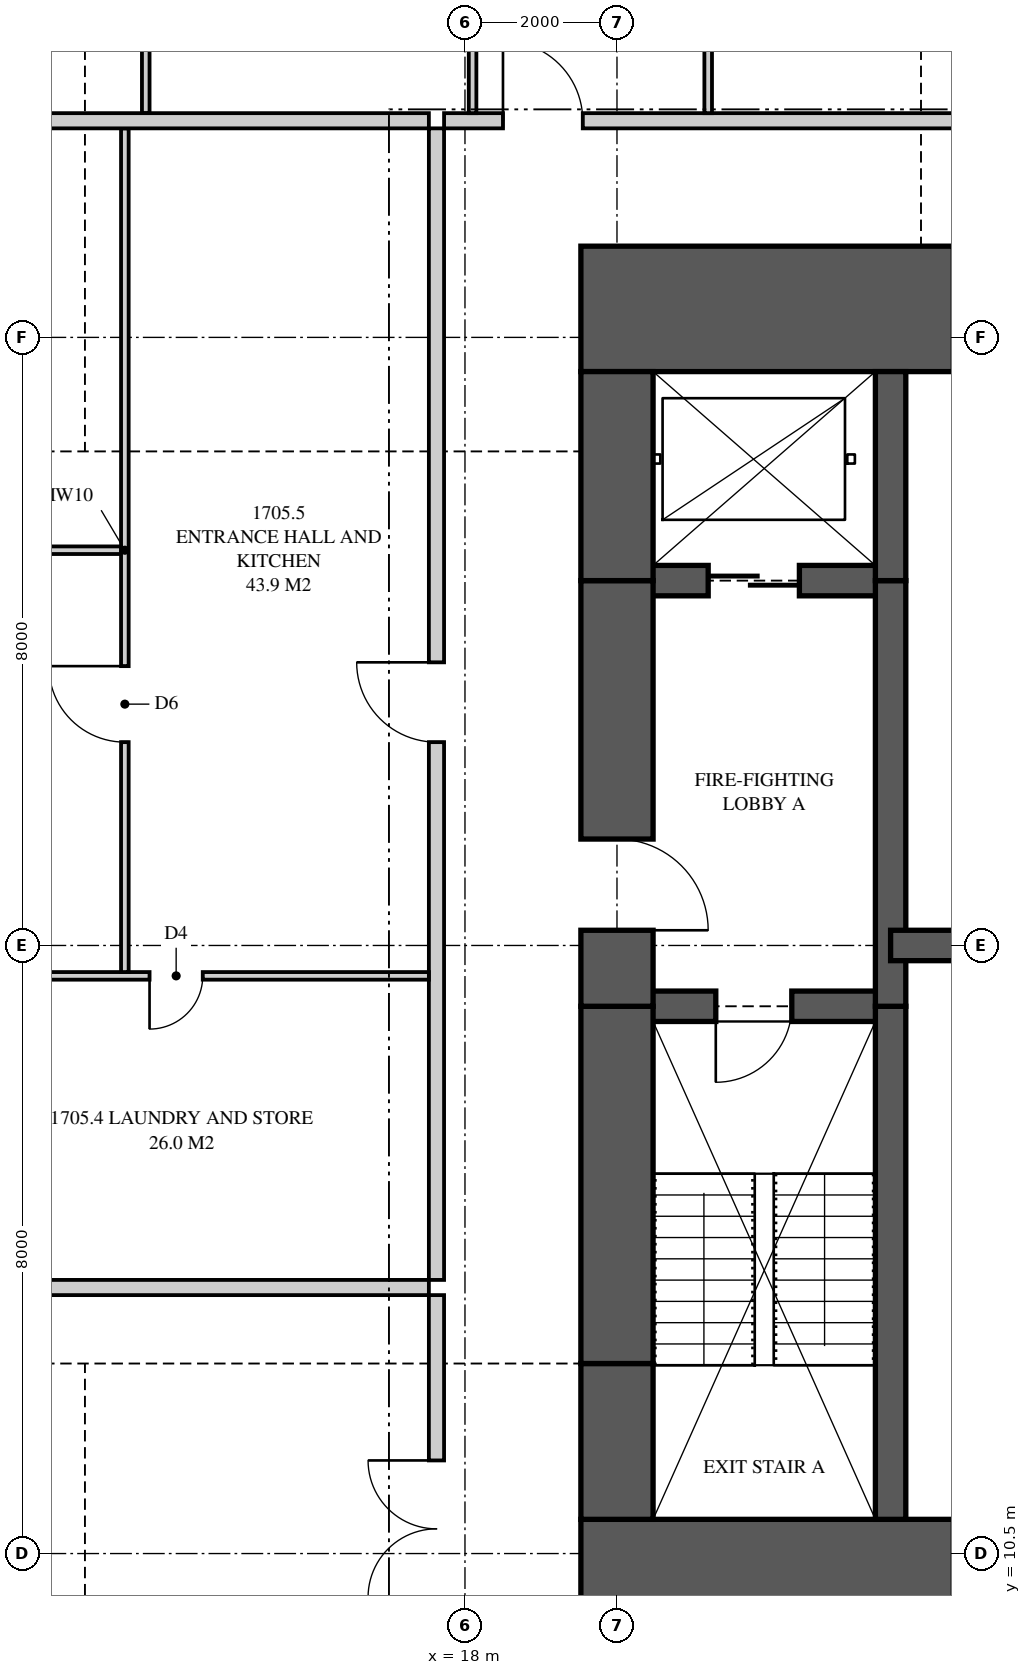
"""IFC4 building model, lengths in metres.
Left out: names, types, materials, properties, quantities, classifications, styles, units other than length and angle.
Written with IfcOpenShell. Run it as: python <this file> out.ifc"""

import sys

from ifc_helpers import new_model, si_unit, direction, frame, frame_2d, origin, place, context, subcontext, project, spatial, polyline, rectangle, outline, extrude, element, fill, save


model = new_model("IFC4")
c1 = context("Model", 3, precision=1e-05, world=origin(), true_north=direction((0.0, 1.0)))
c2 = subcontext(c1, "Body", "Model", "MODEL_VIEW")
j1 = project(units=[si_unit("LENGTHUNIT", "METRE"), si_unit("PLANEANGLEUNIT", "RADIAN")], contexts=[c1])
p1 = place(None, origin())
s1 = spatial("IfcSite", under=j1, at=p1, CompositionType="ELEMENT")
p2 = place(p1, origin())
s2 = spatial("IfcBuilding", under=s1, at=p2, CompositionType="ELEMENT")
p3 = place(p2, frame((0.0, 0.0, 64.55)))
s3 = spatial("IfcBuildingStorey", under=s2, at=p3, CompositionType="ELEMENT", Elevation=64.55)
p4 = place(p3, frame((19.525, 10.125, 0.0), z_axis=(0.0, 0.0, 1.0), x_axis=(1.0, 0.0, 0.0)))
e1 = element("IfcWall", 1, at=p4, inside=s3, PredefinedType="SHEAR", context=c2, shape_type="SweptSolid", body=[
    extrude(rectangle(XDim=6.475, YDim=1.65, at=frame_2d((3.238, 0.0))), origin(), (0.0, 0.0, 1.0), 3.35),
])
p5 = place(p4, frame((4.9, 0.0, 0.0)))
e2 = element("IfcOpeningElement", 2, at=p5, cuts=e1, PredefinedType="OPENING", context=c2, shape_type="SweptSolid", body=[
    extrude(rectangle(XDim=0.75, YDim=2.1, at=frame_2d((0.375, 1.05))), frame((0.0, 0.835, 0.0), z_axis=(0.0, -1.0, 0.0), x_axis=(1.0, 0.0, 0.0)), (0.0, 0.0, 1.0), 1.67),
])
p6 = place(p3, frame((26.0, 26.875, 0.0), z_axis=(0.0, 0.0, 1.0), x_axis=(-1.0, 0.0, 0.0)))
e3 = element("IfcWall", 3, at=p6, inside=s3, PredefinedType="SHEAR", context=c2, shape_type="SweptSolid", body=[
    extrude(rectangle(XDim=6.475, YDim=1.65, at=frame_2d((3.238, 0.0))), origin(), (0.0, 0.0, 1.0), 3.35),
])
p7 = place(p6, frame((0.825, 0.0, 0.0)))
e4 = element("IfcOpeningElement", 4, at=p7, cuts=e3, PredefinedType="OPENING", context=c2, shape_type="SweptSolid", body=[
    extrude(rectangle(XDim=0.75, YDim=2.1, at=frame_2d((0.375, 1.05))), frame((0.0, 0.835, 0.0), z_axis=(0.0, -1.0, 0.0), x_axis=(1.0, 0.0, 0.0)), (0.0, 0.0, 1.0), 1.67),
])
p8 = place(p3, frame((20.0, 26.05, 0.0), z_axis=(0.0, 0.0, 1.0), x_axis=(0.0, -1.0, 0.0)))
e5 = element("IfcWall", 5, at=p8, inside=s3, PredefinedType="SHEAR", context=c2, shape_type="SweptSolid", body=[
    extrude(rectangle(XDim=2.75, YDim=0.95, at=frame_2d((1.375, 0.0))), origin(), (0.0, 0.0, 1.0), 3.35),
])
p9 = place(p3, frame((20.0, 23.3, 0.0), z_axis=(0.0, 0.0, 1.0), x_axis=(0.0, -1.0, 0.0)))
e6 = element("IfcWall", 6, at=p9, inside=s3, PredefinedType="SHEAR", context=c2, shape_type="SweptSolid", body=[
    extrude(rectangle(XDim=5.6, YDim=0.95, at=frame_2d((2.8, 0.0))), origin(), (0.0, 0.0, 1.0), 3.35),
])
p10 = place(p9, frame((3.4, 0.0, 0.0)))
e7 = element("IfcOpeningElement", 7, at=p10, cuts=e6, PredefinedType="OPENING", context=c2, shape_type="SweptSolid", body=[
    extrude(rectangle(XDim=1.2, YDim=2.2, at=frame_2d((0.6, 1.1))), frame((0.0, 0.485, 0.0), z_axis=(0.0, -1.0, 0.0), x_axis=(1.0, 0.0, 0.0)), (0.0, 0.0, 1.0), 0.97),
])
p11 = place(p3, frame((20.0, 17.7, 0.0), z_axis=(0.0, 0.0, 1.0), x_axis=(0.0, -1.0, 0.0)))
e8 = element("IfcWall", 8, at=p11, inside=s3, PredefinedType="SHEAR", context=c2, shape_type="SweptSolid", body=[
    extrude(rectangle(XDim=4.7, YDim=0.95, at=frame_2d((2.35, 0.0))), origin(), (0.0, 0.0, 1.0), 3.35),
])
p12 = place(p3, frame((20.0, 13.0, 0.0), z_axis=(0.0, 0.0, 1.0), x_axis=(0.0, -1.0, 0.0)))
e9 = element("IfcWall", 9, at=p12, inside=s3, PredefinedType="SHEAR", context=c2, shape_type="SweptSolid", body=[
    extrude(rectangle(XDim=2.05, YDim=0.95, at=frame_2d((1.025, 0.0))), origin(), (0.0, 0.0, 1.0), 3.35),
])
p13 = place(p3, frame((23.6, 10.95, 0.0), z_axis=(0.0, 0.0, 1.0), x_axis=(0.0, 1.0, 0.0)))
e10 = element("IfcWall", 10, at=p13, inside=s3, PredefinedType="SHEAR", context=c2, shape_type="SweptSolid", body=[
    extrude(rectangle(XDim=6.75, YDim=0.4, at=frame_2d((3.375, 0.0))), origin(), (0.0, 0.0, 1.0), 3.35),
])
p14 = place(p3, frame((23.6, 17.7, 0.0), z_axis=(0.0, 0.0, 1.0), x_axis=(0.0, 1.0, 0.0)))
e11 = element("IfcWall", 11, at=p14, inside=s3, PredefinedType="SHEAR", context=c2, shape_type="SweptSolid", body=[
    extrude(rectangle(XDim=5.6, YDim=0.4, at=frame_2d((2.8, 0.0))), origin(), (0.0, 0.0, 1.0), 3.35),
])
p15 = place(p3, frame((23.6, 23.3, 0.0), z_axis=(0.0, 0.0, 1.0), x_axis=(0.0, 1.0, 0.0)))
e12 = element("IfcWall", 12, at=p15, inside=s3, PredefinedType="SHEAR", context=c2, shape_type="SweptSolid", body=[
    extrude(rectangle(XDim=2.75, YDim=0.4, at=frame_2d((1.375, 0.0))), origin(), (0.0, 0.0, 1.0), 3.35),
])
p16 = place(p3, frame((20.0, 17.7, 0.0), z_axis=(0.0, 0.0, 1.0), x_axis=(1.0, 0.0, 0.0)))
e13 = element("IfcWall", 13, at=p16, inside=s3, PredefinedType="SHEAR", context=c2, shape_type="SweptSolid", body=[
    extrude(rectangle(XDim=3.6, YDim=0.4, at=frame_2d((1.8, 0.0))), origin(), (0.0, 0.0, 1.0), 3.35),
])
p17 = place(p16, frame((1.3, 0.0, 0.0)))
e14 = element("IfcOpeningElement", 14, at=p17, cuts=e13, PredefinedType="OPENING", context=c2, shape_type="SweptSolid", body=[
    extrude(rectangle(XDim=1.0, YDim=2.1, at=frame_2d((0.5, 1.05))), frame((0.0, 0.21, 0.0), z_axis=(0.0, -1.0, 0.0), x_axis=(1.0, 0.0, 0.0)), (0.0, 0.0, 1.0), 0.42),
])
p18 = place(p3, frame((20.0, 23.3, 0.0), z_axis=(0.0, 0.0, 1.0), x_axis=(1.0, 0.0, 0.0)))
e15 = element("IfcWall", 15, at=p18, inside=s3, PredefinedType="SHEAR", context=c2, shape_type="SweptSolid", body=[
    extrude(rectangle(XDim=3.6, YDim=0.4, at=frame_2d((1.8, 0.0))), origin(), (0.0, 0.0, 1.0), 3.35),
])
p19 = place(p18, frame((1.2, 0.0, 0.0)))
e16 = element("IfcOpeningElement", 16, at=p19, cuts=e15, PredefinedType="OPENING", context=c2, shape_type="SweptSolid", body=[
    extrude(rectangle(XDim=1.2, YDim=2.1, at=frame_2d((0.6, 1.05))), frame((0.0, 0.21, 0.0), z_axis=(0.0, -1.0, 0.0), x_axis=(1.0, 0.0, 0.0)), (0.0, 0.0, 1.0), 0.42),
])
p20 = place(p3, frame((23.6, 18.5, 0.0), z_axis=(0.0, 0.0, 1.0), x_axis=(1.0, 0.0, 0.0)))
e17 = element("IfcWall", 17, at=p20, inside=s3, PredefinedType="SHEAR", context=c2, shape_type="SweptSolid", body=[
    extrude(rectangle(XDim=2.4, YDim=0.4, at=frame_2d((1.2, 0.0))), origin(), (0.0, 0.0, 1.0), 3.35),
])
p21 = place(p3, frame((17.725, 29.35, 0.0), z_axis=(0.0, 0.0, 1.0), x_axis=(1.0, 0.0, 0.0)))
e18 = element("IfcWall", 18, at=p21, inside=s3, PredefinedType="PARTITIONING", context=c2, shape_type="SweptSolid", body=[
    extrude(outline(polyline([(0.0, 0.0), (7.075, 0.0), (7.075, 3.11), (6.612, 3.11), (6.612, 2.541), (5.938, 2.541), (5.938, 3.11), (0.0, 3.11), (0.0, 0.0)])), frame((0.0, 0.1, 0.0), z_axis=(0.0, -1.0, 0.0), x_axis=(1.0, 0.0, 0.0)), (0.0, 0.0, 1.0), 0.2),
])
p22 = place(p21, frame((0.775, 0.0, 0.0)))
e19 = element("IfcOpeningElement", 19, at=p22, cuts=e18, PredefinedType="OPENING", context=c2, shape_type="SweptSolid", body=[
    extrude(rectangle(XDim=1.05, YDim=2.2, at=frame_2d((0.525, 1.1))), frame((0.0, 0.11, 0.0), z_axis=(0.0, -1.0, 0.0), x_axis=(1.0, 0.0, 0.0)), (0.0, 0.0, 1.0), 0.22),
])
p23 = place(p3, frame((13.8, 37.825, 0.0), z_axis=(0.0, 0.0, 1.0), x_axis=(0.0, -1.0, 0.0)))
e20 = element("IfcWall", 20, at=p23, inside=s3, PredefinedType="PARTITIONING", context=c2, shape_type="SweptSolid", body=[
    extrude(outline(polyline([(1.635, 2.15), (0.0, 2.15), (0.0, 0.0), (8.375, 0.0), (8.375, 3.11), (1.635, 3.11), (1.635, 2.15)]), holes=[polyline([(1.021, 0.133), (0.529, 0.133), (0.529, 0.923), (1.021, 0.923), (1.021, 0.133)]), polyline([(1.021, 1.227), (0.529, 1.227), (0.529, 2.017), (1.021, 2.017), (1.021, 1.227)])]), frame((0.0, 0.05, 0.0), z_axis=(0.0, -1.0, 0.0), x_axis=(1.0, 0.0, 0.0)), (0.0, 0.0, 1.0), 0.1),
])
p24 = place(p23, frame((4.525, 0.0, 0.0)))
e21 = element("IfcOpeningElement", 21, at=p24, cuts=e20, PredefinedType="OPENING", context=c2, shape_type="SweptSolid", body=[
    extrude(rectangle(XDim=0.9, YDim=2.1, at=frame_2d((0.45, 1.05))), frame((0.0, 0.06, 0.0), z_axis=(0.0, -1.0, 0.0), x_axis=(1.0, 0.0, 0.0)), (0.0, 0.0, 1.0), 0.12),
])
p25 = place(p3, frame((18.1, 37.825, 0.0), z_axis=(0.0, 0.0, 1.0), x_axis=(0.0, -1.0, 0.0)))
e22 = element("IfcWall", 22, at=p25, inside=s3, PredefinedType="PARTITIONING", context=c2, shape_type="SweptSolid", body=[
    extrude(outline(polyline([(0.0, 0.0), (8.375, 0.0), (8.375, 3.11), (1.635, 3.11), (1.635, 2.15), (0.0, 2.15), (0.0, 3.11), (0.0, 0.0)])), frame((0.0, 0.05, 0.0), z_axis=(0.0, -1.0, 0.0), x_axis=(1.0, 0.0, 0.0)), (0.0, 0.0, 1.0), 0.1),
])
p26 = place(p25, frame((4.525, 0.0, 0.0)))
e23 = element("IfcOpeningElement", 23, at=p26, cuts=e22, PredefinedType="OPENING", context=c2, shape_type="SweptSolid", body=[
    extrude(rectangle(XDim=0.9, YDim=2.1, at=frame_2d((0.45, 1.05))), frame((0.0, 0.06, 0.0), z_axis=(0.0, -1.0, 0.0), x_axis=(1.0, 0.0, 0.0)), (0.0, 0.0, 1.0), 0.12),
])
p27 = place(p25, frame((5.95, 0.0, 0.0)))
e24 = element("IfcOpeningElement", 24, at=p27, cuts=e22, PredefinedType="OPENING", context=c2, shape_type="SweptSolid", body=[
    extrude(rectangle(XDim=0.9, YDim=2.1, at=frame_2d((0.45, 1.05))), frame((0.0, 0.06, 0.0), z_axis=(0.0, -1.0, 0.0), x_axis=(1.0, 0.0, 0.0)), (0.0, 0.0, 1.0), 0.12),
])
p28 = place(p3, frame((21.2, 32.4, 0.0), z_axis=(0.0, 0.0, 1.0), x_axis=(0.0, -1.0, 0.0)))
e25 = element("IfcWall", 25, at=p28, inside=s3, PredefinedType="PARTITIONING", context=c2, shape_type="SweptSolid", body=[
    extrude(rectangle(XDim=2.95, YDim=0.1, at=frame_2d((1.475, 0.0))), origin(), (0.0, 0.0, 1.0), 3.11),
])
p29 = place(p3, frame((2.0, 29.35, 0.0), z_axis=(0.0, 0.0, 1.0), x_axis=(1.0, 0.0, 0.0)))
e26 = element("IfcWall", 26, at=p29, inside=s3, PredefinedType="PARTITIONING", context=c2, shape_type="SweptSolid", body=[
    extrude(outline(polyline([(0.0, 0.0), (15.525, 0.0), (15.525, 3.11), (11.337, 3.11), (11.337, 2.541), (10.663, 2.541), (10.663, 3.11), (9.51, 3.11), (9.51, 2.51), (6.89, 2.51), (6.89, 3.11), (2.969, 3.11), (2.969, 2.541), (2.577, 2.541), (2.577, 2.15), (0.733, 2.15), (0.733, 3.11), (0.0, 3.11), (0.0, 0.0)])), frame((0.0, 0.1, 0.0), z_axis=(0.0, -1.0, 0.0), x_axis=(1.0, 0.0, 0.0)), (0.0, 0.0, 1.0), 0.2),
])
p30 = place(p3, frame((2.175, 14.0, 0.0), z_axis=(0.0, 0.0, 1.0), x_axis=(1.0, 0.0, 0.0)))
e27 = element("IfcWall", 27, at=p30, inside=s3, PredefinedType="PARTITIONING", context=c2, shape_type="SweptSolid", body=[
    extrude(outline(polyline([(0.529, 2.15), (0.0, 2.15), (0.0, 0.0), (0.529, 0.0), (0.529, 0.82), (1.021, 0.82), (1.021, 0.0), (15.35, 0.0), (15.35, 3.11), (9.335, 3.11), (9.335, 2.51), (6.715, 2.51), (6.715, 3.11), (1.685, 3.11), (1.685, 2.15), (1.021, 2.15), (1.021, 1.33), (0.529, 1.33), (0.529, 2.15)])), frame((0.0, 0.1, 0.0), z_axis=(0.0, -1.0, 0.0), x_axis=(1.0, 0.0, 0.0)), (0.0, 0.0, 1.0), 0.2),
])
p31 = place(p3, frame((17.625, 7.75, 0.0), z_axis=(0.0, 0.0, 1.0), x_axis=(0.0, 1.0, 0.0)))
e28 = element("IfcWall", 28, at=p31, inside=s3, PredefinedType="PARTITIONING", context=c2, shape_type="SweptSolid", body=[
    extrude(outline(polyline([(0.0, 0.0), (6.15, 0.0), (6.15, 3.11), (5.587, 3.11), (5.587, 2.541), (4.913, 2.541), (4.913, 3.11), (0.0, 3.11), (0.0, 0.0)])), frame((0.0, 0.1, 0.0), z_axis=(0.0, -1.0, 0.0), x_axis=(1.0, 0.0, 0.0)), (0.0, 0.0, 1.0), 0.2),
])
p32 = place(p31, frame((2.175, 0.0, 0.0)))
e29 = element("IfcOpeningElement", 29, at=p32, cuts=e28, PredefinedType="OPENING", context=c2, shape_type="SweptSolid", body=[
    extrude(rectangle(XDim=1.8, YDim=2.1, at=frame_2d((0.9, 1.05))), frame((0.0, 0.11, 0.0), z_axis=(0.0, -1.0, 0.0), x_axis=(1.0, 0.0, 0.0)), (0.0, 0.0, 1.0), 0.22),
])
p33 = place(p3, frame((17.625, 14.1, 0.0), z_axis=(0.0, 0.0, 1.0), x_axis=(0.0, 1.0, 0.0)))
e30 = element("IfcWall", 30, at=p33, inside=s3, PredefinedType="PARTITIONING", context=c2, shape_type="SweptSolid", body=[
    extrude(outline(polyline([(0.0, 0.0), (15.15, 0.0), (15.15, 3.11), (11.237, 3.11), (11.237, 2.541), (10.562, 2.541), (10.562, 3.11), (0.0, 3.11), (0.0, 0.0)])), frame((0.0, 0.1, 0.0), z_axis=(0.0, -1.0, 0.0), x_axis=(1.0, 0.0, 0.0)), (0.0, 0.0, 1.0), 0.2),
])
p34 = place(p33, frame((7.075, 0.0, 0.0)))
e31 = element("IfcOpeningElement", 31, at=p34, cuts=e30, PredefinedType="OPENING", context=c2, shape_type="SweptSolid", body=[
    extrude(rectangle(XDim=1.05, YDim=2.2, at=frame_2d((0.525, 1.1))), frame((0.0, 0.11, 0.0), z_axis=(0.0, -1.0, 0.0), x_axis=(1.0, 0.0, 0.0)), (0.0, 0.0, 1.0), 0.22),
])
p35 = place(p3, frame((2.175, 18.1, 0.0), z_axis=(0.0, 0.0, 1.0), x_axis=(1.0, 0.0, 0.0)))
e32 = element("IfcWall", 32, at=p35, inside=s3, PredefinedType="PARTITIONING", context=c2, shape_type="SweptSolid", body=[
    extrude(outline(polyline([(0.0, 0.0), (15.35, 0.0), (15.35, 3.11), (9.285, 3.11), (9.285, 2.51), (6.765, 2.51), (6.765, 3.11), (1.635, 3.11), (1.635, 2.15), (0.0, 2.15), (0.0, 3.11), (0.0, 0.0)])), frame((0.0, 0.05, 0.0), z_axis=(0.0, -1.0, 0.0), x_axis=(1.0, 0.0, 0.0)), (0.0, 0.0, 1.0), 0.1),
])
p36 = place(p35, frame((4.85, 0.0, 0.0)))
e33 = element("IfcOpeningElement", 33, at=p36, cuts=e32, PredefinedType="OPENING", context=c2, shape_type="SweptSolid", body=[
    extrude(rectangle(XDim=0.9, YDim=2.1, at=frame_2d((0.45, 1.05))), frame((0.0, 0.06, 0.0), z_axis=(0.0, -1.0, 0.0), x_axis=(1.0, 0.0, 0.0)), (0.0, 0.0, 1.0), 0.12),
])
p37 = place(p35, frame((11.675, 0.0, 0.0)))
e34 = element("IfcOpeningElement", 34, at=p37, cuts=e32, PredefinedType="OPENING", context=c2, shape_type="SweptSolid", body=[
    extrude(rectangle(XDim=0.7, YDim=2.1, at=frame_2d((0.35, 1.05))), frame((0.0, 0.06, 0.0), z_axis=(0.0, -1.0, 0.0), x_axis=(1.0, 0.0, 0.0)), (0.0, 0.0, 1.0), 0.12),
])
p38 = place(p3, frame((13.525, 18.15, 0.0), z_axis=(0.0, 0.0, 1.0), x_axis=(0.0, 1.0, 0.0)))
e35 = element("IfcWall", 35, at=p38, inside=s3, PredefinedType="PARTITIONING", context=c2, shape_type="SweptSolid", body=[
    extrude(outline(polyline([(0.0, 0.0), (11.1, 0.0), (11.1, 3.11), (7.137, 3.11), (7.137, 2.541), (6.563, 2.541), (6.563, 3.11), (0.0, 3.11), (0.0, 0.0)])), frame((0.0, 0.05, 0.0), z_axis=(0.0, -1.0, 0.0), x_axis=(1.0, 0.0, 0.0)), (0.0, 0.0, 1.0), 0.1),
])
p39 = place(p38, frame((3.025, 0.0, 0.0)))
e36 = element("IfcOpeningElement", 36, at=p39, cuts=e35, PredefinedType="OPENING", context=c2, shape_type="SweptSolid", body=[
    extrude(rectangle(XDim=1.0, YDim=2.1, at=frame_2d((0.5, 1.05))), frame((0.0, 0.06, 0.0), z_axis=(0.0, -1.0, 0.0), x_axis=(1.0, 0.0, 0.0)), (0.0, 0.0, 1.0), 0.12),
])
p40 = place(p3, frame((2.175, 23.7, 0.0), z_axis=(0.0, 0.0, 1.0), x_axis=(1.0, 0.0, 0.0)))
e37 = element("IfcWall", 37, at=p40, inside=s3, PredefinedType="PARTITIONING", context=c2, shape_type="SweptSolid", body=[
    extrude(outline(polyline([(0.529, 2.15), (0.0, 2.15), (0.0, 0.0), (0.529, 0.0), (0.529, 0.581), (1.021, 0.581), (1.021, 0.0), (11.3, 0.0), (11.3, 3.11), (9.285, 3.11), (9.285, 2.51), (6.765, 2.51), (6.765, 3.11), (1.635, 3.11), (1.635, 2.15), (1.021, 2.15), (1.021, 1.569), (0.529, 1.569), (0.529, 2.15)])), frame((0.0, 0.05, 0.0), z_axis=(0.0, -1.0, 0.0), x_axis=(1.0, 0.0, 0.0)), (0.0, 0.0, 1.0), 0.1),
])
p41 = place(p40, frame((5.15, 0.0, 0.0)))
e38 = element("IfcOpeningElement", 38, at=p41, cuts=e37, PredefinedType="OPENING", context=c2, shape_type="SweptSolid", body=[
    extrude(rectangle(XDim=1.0, YDim=2.1, at=frame_2d((0.5, 1.05))), frame((0.0, 0.06, 0.0), z_axis=(0.0, -1.0, 0.0), x_axis=(1.0, 0.0, 0.0)), (0.0, 0.0, 1.0), 0.12),
])
p42 = place(p22, origin())
e39 = element("IfcDoor", 39, at=p42, inside=s3, OperationType="SINGLE_SWING_LEFT", PredefinedType="DOOR", context=c2, shape_type="SweptSolid", body=[
    extrude(rectangle(XDim=1.05, YDim=2.2, at=frame_2d((0.525, 1.1))), frame((0.0, 0.025, 0.0), z_axis=(0.0, -1.0, 0.0), x_axis=(1.0, 0.0, 0.0)), (0.0, 0.0, 1.0), 0.05),
])
fill(e19, e39)
p43 = place(p32, origin())
e40 = element("IfcDoor", 40, at=p43, inside=s3, OperationType="DOUBLE_DOOR_SINGLE_SWING", PredefinedType="DOOR", context=c2, shape_type="SweptSolid", body=[
    extrude(rectangle(XDim=1.8, YDim=2.1, at=frame_2d((0.9, 1.05))), frame((0.0, 0.025, 0.0), z_axis=(0.0, -1.0, 0.0), x_axis=(1.0, 0.0, 0.0)), (0.0, 0.0, 1.0), 0.05),
])
fill(e29, e40)
p44 = place(p34, origin())
e41 = element("IfcDoor", 41, at=p44, inside=s3, OperationType="SINGLE_SWING_RIGHT", PredefinedType="DOOR", context=c2, shape_type="SweptSolid", body=[
    extrude(rectangle(XDim=1.05, YDim=2.2, at=frame_2d((0.525, 1.1))), frame((0.0, 0.025, 0.0), z_axis=(0.0, -1.0, 0.0), x_axis=(1.0, 0.0, 0.0)), (0.0, 0.0, 1.0), 0.05),
])
fill(e31, e41)
p45 = place(p37, frame((0.7, 0.0, 0.0), z_axis=(0.0, 0.0, 1.0), x_axis=(-1.0, 0.0, 0.0)))
e42 = element("IfcDoor", 42, at=p45, inside=s3, OperationType="SINGLE_SWING_RIGHT", PredefinedType="DOOR", context=c2, shape_type="SweptSolid", body=[
    extrude(rectangle(XDim=0.7, YDim=2.1, at=frame_2d((0.35, 1.05))), frame((0.0, 0.025, 0.0), z_axis=(0.0, -1.0, 0.0), x_axis=(1.0, 0.0, 0.0)), (0.0, 0.0, 1.0), 0.05),
])
fill(e34, e42)
p46 = place(p39, origin())
e43 = element("IfcDoor", 43, at=p46, inside=s3, OperationType="SINGLE_SWING_RIGHT", PredefinedType="DOOR", context=c2, shape_type="SweptSolid", body=[
    extrude(rectangle(XDim=1.0, YDim=2.1, at=frame_2d((0.5, 1.05))), frame((0.0, 0.025, 0.0), z_axis=(0.0, -1.0, 0.0), x_axis=(1.0, 0.0, 0.0)), (0.0, 0.0, 1.0), 0.05),
])
fill(e36, e43)
p47 = place(p17, frame((1.0, 0.0, 0.0), z_axis=(0.0, 0.0, 1.0), x_axis=(-1.0, 0.0, 0.0)))
e44 = element("IfcDoor", 44, at=p47, inside=s3, OperationType="SINGLE_SWING_RIGHT", PredefinedType="DOOR", context=c2, shape_type="SweptSolid", body=[
    extrude(rectangle(XDim=1.0, YDim=2.1, at=frame_2d((0.5, 1.05))), frame((0.0, 0.025, 0.0), z_axis=(0.0, -1.0, 0.0), x_axis=(1.0, 0.0, 0.0)), (0.0, 0.0, 1.0), 0.05),
])
fill(e14, e44)
p48 = place(p10, origin())
e45 = element("IfcDoor", 45, at=p48, inside=s3, OperationType="SINGLE_SWING_RIGHT", PredefinedType="DOOR", context=c2, shape_type="SweptSolid", body=[
    extrude(rectangle(XDim=1.2, YDim=2.2, at=frame_2d((0.6, 1.1))), frame((0.0, 0.025, 0.0), z_axis=(0.0, -1.0, 0.0), x_axis=(1.0, 0.0, 0.0)), (0.0, 0.0, 1.0), 0.05),
])
fill(e7, e45)
p49 = place(p19, origin())
e46 = element("IfcDoor", 46, at=p49, inside=s3, OperationType="SLIDING_TO_LEFT", PredefinedType="DOOR", context=c2, shape_type="SweptSolid", body=[
    extrude(rectangle(XDim=1.2, YDim=2.1, at=frame_2d((0.6, 1.05))), frame((0.0, 0.025, 0.0), z_axis=(0.0, -1.0, 0.0), x_axis=(1.0, 0.0, 0.0)), (0.0, 0.0, 1.0), 0.05),
])
fill(e16, e46)
save(model, sys.argv[1])
